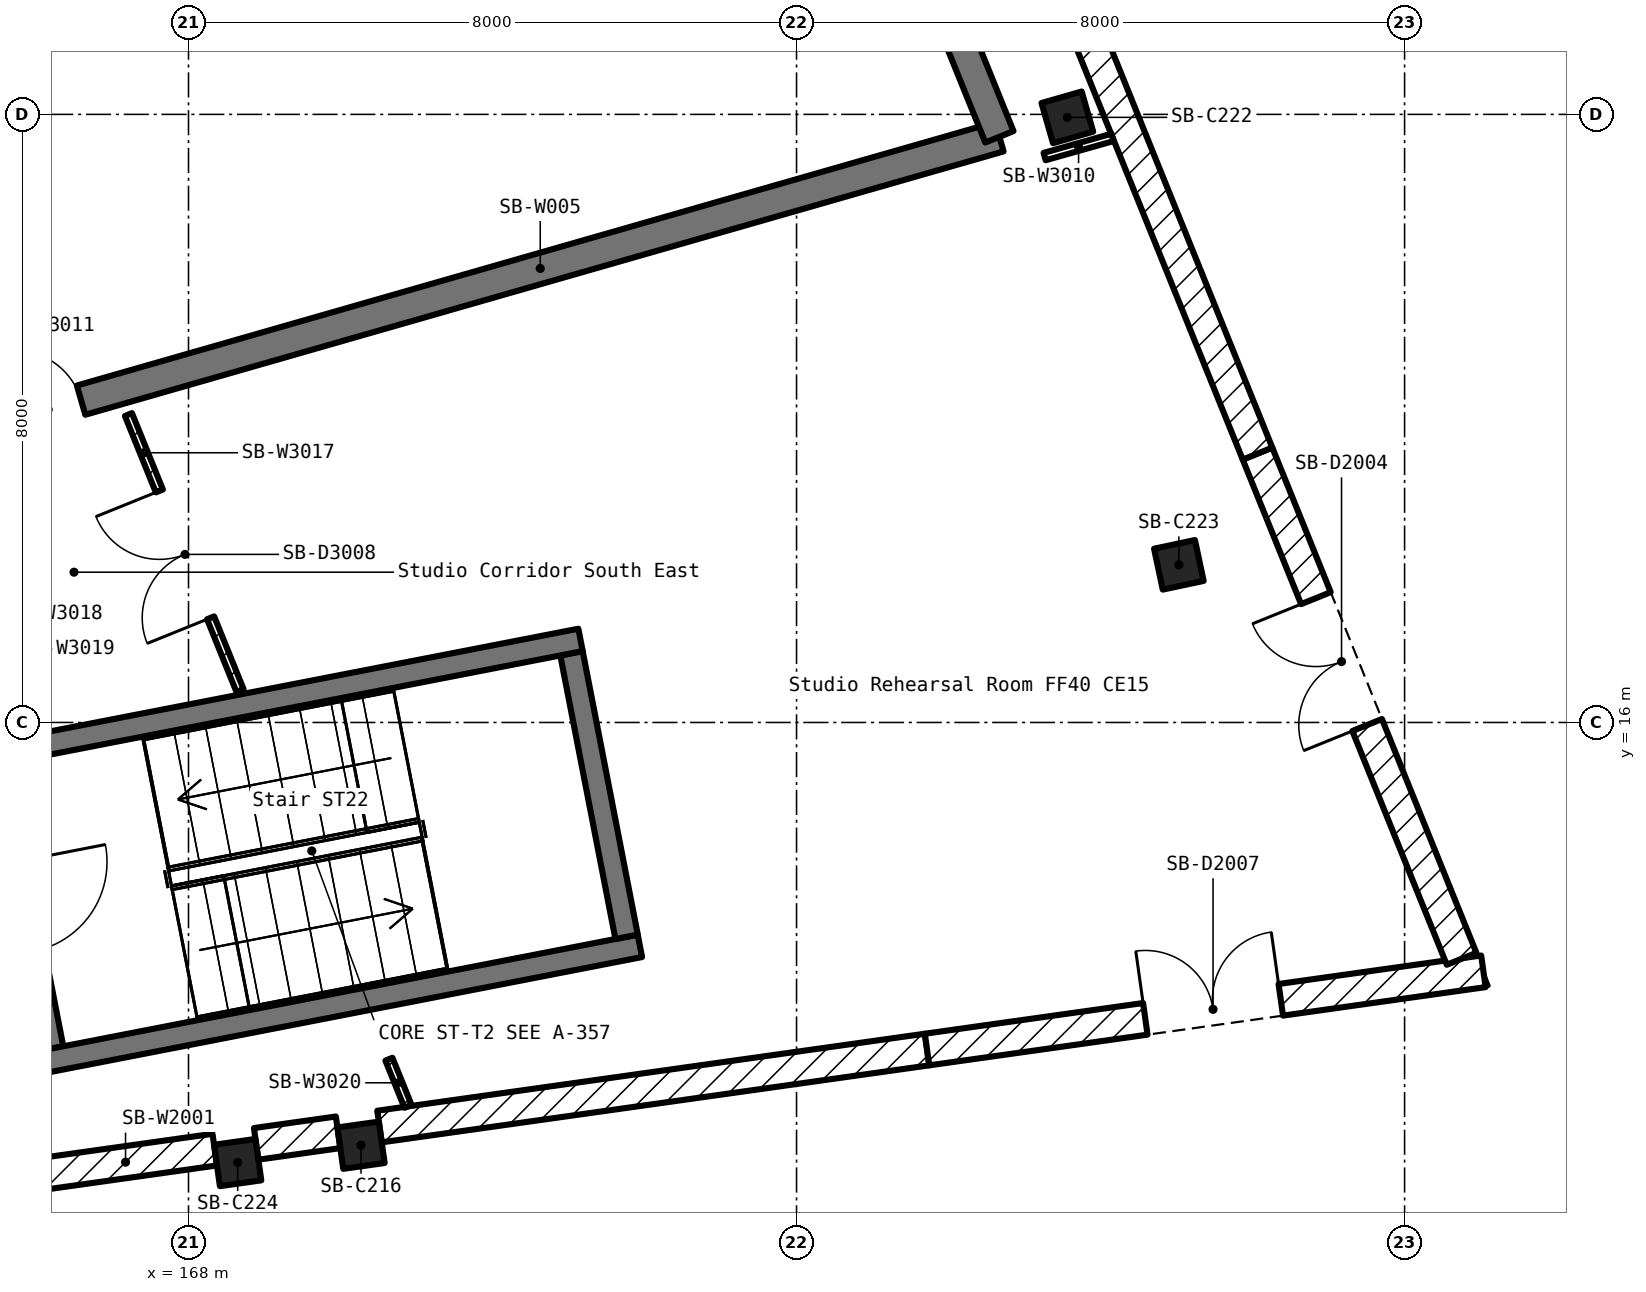
"""IFC4 building model, lengths in metres.
Left out: names, types, materials, properties, quantities, classifications, styles, units other than length and angle.
Written with IfcOpenShell. Run it as: python <this file> out.ifc"""

import sys

from ifc_helpers import new_model, si_unit, direction, frame, frame_2d, origin, origin_2d, place, context, subcontext, project, spatial, rectangle, extrude, element, fill, save


model = new_model("IFC4")
c1 = context("Model", 3, precision=1e-05, world=origin(), true_north=direction((0.0, 1.0)))
c2 = subcontext(c1, "Body", "Model", "MODEL_VIEW")
j1 = project(units=[si_unit("LENGTHUNIT", "METRE"), si_unit("PLANEANGLEUNIT", "RADIAN")], contexts=[c1])
p1 = place(None, origin())
s1 = spatial("IfcSite", under=j1, at=p1, CompositionType="ELEMENT")
p2 = place(p1, origin())
s2 = spatial("IfcBuilding", under=s1, at=p2, CompositionType="ELEMENT")
p3 = place(p2, origin())
s3 = spatial("IfcBuildingStorey", under=s2, at=p3, CompositionType="ELEMENT", Elevation=0.0)
for number, where, z_axis, x_axis in (
    (1, (170.27, 10.438, 0.0), (0.0, 0.0, 1.0), (0.139, -0.99, 0.0)),
    (2, (179.563, 23.961, 0.0), (0.0, 0.0, 1.0), (0.276, -0.961, 0.0)),
    (3, (181.03, 18.074, 0.0), (0.0, 0.0, 1.0), (0.208, -0.978, 0.0)),
    (4, (168.647, 10.21, 0.0), (0.0, 0.0, 1.0), (0.139, -0.99, 0.0)),
):
    element("IfcColumn", number, at=place(p3, frame(where, z_axis=z_axis, x_axis=x_axis)), inside=s3, PredefinedType="COLUMN", context=c2, shape_type="SweptSolid", body=[
        extrude(rectangle(XDim=0.55, YDim=0.55, at=origin_2d()), origin(), (0.0, 0.0, 1.0), 6.0),
    ])
p4 = place(p3, frame((157.521, 17.641, -6.3), z_axis=(0.0, 0.0, 1.0), x_axis=(0.961263044958, 0.275632651182, 0.0)))
e5 = element("IfcWall", 5, at=p4, inside=s3, PredefinedType="SHEAR", context=c2, shape_type="SweptSolid", body=[
    extrude(rectangle(XDim=22.0, YDim=0.4, at=frame_2d((11.0, 0.0))), origin(), (0.0, 0.0, 1.0), 12.3),
])
p5 = place(p4, frame((8.531, 0.0, 6.3)))
e6 = element("IfcOpeningElement", 6, at=p5, cuts=e5, PredefinedType="OPENING", context=c2, shape_type="SweptSolid", body=[
    extrude(rectangle(XDim=0.9, YDim=2.1, at=frame_2d((0.45, 1.05))), frame((0.0, 0.212, 0.0), z_axis=(0.0, -1.0, 0.0), x_axis=(1.0, 0.0, 0.0)), (0.0, 0.0, 1.0), 0.424),
])
p6 = place(p3, frame((178.669, 23.705, -6.3), z_axis=(0.0, 0.0, 1.0), x_axis=(-0.374642655757, 0.92716928362, 0.0)))
e7 = element("IfcWall", 7, at=p6, inside=s3, PredefinedType="SHEAR", context=c2, shape_type="SweptSolid", body=[
    extrude(rectangle(XDim=17.979, YDim=0.4, at=frame_2d((8.99, 0.0))), origin(), (0.0, 0.0, 1.0), 12.3),
])
p7 = place(p6, frame((8.09, 0.0, 6.3)))
e8 = element("IfcOpeningElement", 8, at=p7, cuts=e7, PredefinedType="OPENING", context=c2, shape_type="SweptSolid", body=[
    extrude(rectangle(XDim=1.8, YDim=2.1, at=frame_2d((0.9, 1.05))), frame((0.0, 0.212, 0.0), z_axis=(0.0, -1.0, 0.0), x_axis=(1.0, 0.0, 0.0)), (0.0, 0.0, 1.0), 0.424),
])
p8 = place(p6, frame((12.59, 0.0, 6.3)))
e9 = element("IfcOpeningElement", 9, at=p8, cuts=e7, PredefinedType="OPENING", context=c2, shape_type="SweptSolid", body=[
    extrude(rectangle(XDim=1.8, YDim=2.1, at=frame_2d((0.9, 1.05))), frame((0.0, 0.212, 0.0), z_axis=(0.0, -1.0, 0.0), x_axis=(1.0, 0.0, 0.0)), (0.0, 0.0, 1.0), 0.424),
])
p9 = place(p3, frame((163.077, 9.639, 0.0), z_axis=(0.0, 0.0, 1.0), x_axis=(0.990252820999, 0.139281551197, 0.0)))
e10 = element("IfcWall", 10, at=p9, inside=s3, PredefinedType="SOLIDWALL", context=c2, shape_type="SweptSolid", body=[
    extrude(rectangle(XDim=5.32, YDim=0.42, at=frame_2d((2.66, 0.0))), origin(), (0.0, 0.0, 1.0), 4.98),
])
p10 = place(p9, frame((1.15, 0.0, 0.0)))
e11 = element("IfcOpeningElement", 11, at=p10, cuts=e10, PredefinedType="OPENING", context=c2, shape_type="SweptSolid", body=[
    extrude(rectangle(XDim=1.8, YDim=2.4, at=frame_2d((0.9, 1.2))), frame((0.0, 0.222, 0.0), z_axis=(0.0, -1.0, 0.0), x_axis=(1.0, 0.0, 0.0)), (0.0, 0.0, 1.0), 0.444),
])
p11 = place(p3, frame((168.89, 10.456, 0.0), z_axis=(0.0, 0.0, 1.0), x_axis=(0.990225632743, 0.139474715481, 0.0)))
e12 = element("IfcWall", 12, at=p11, inside=s3, PredefinedType="SOLIDWALL", context=c2, shape_type="SweptSolid", body=[
    extrude(rectangle(XDim=1.089, YDim=0.42, at=frame_2d((0.544, 0.0))), origin(), (0.0, 0.0, 1.0), 4.98),
])
p12 = place(p3, frame((170.513, 10.684, 0.0), z_axis=(0.0, 0.0, 1.0), x_axis=(0.990259181758, 0.139236320493, 0.0)))
e13 = element("IfcWall", 13, at=p12, inside=s3, PredefinedType="SOLIDWALL", context=c2, shape_type="SweptSolid", body=[
    extrude(rectangle(XDim=7.275, YDim=0.42, at=frame_2d((3.637, 0.0))), origin(), (0.0, 0.0, 1.0), 5.78),
])
p13 = place(p3, frame((177.717, 11.697, 0.0), z_axis=(0.0, 0.0, 1.0), x_axis=(0.990262769028, 0.139210805171, 0.0)))
e14 = element("IfcWall", 14, at=p13, inside=s3, PredefinedType="SOLIDWALL", context=c2, shape_type="SweptSolid", body=[
    extrude(rectangle(XDim=7.392, YDim=0.42, at=frame_2d((3.696, 0.0))), origin(), (0.0, 0.0, 1.0), 5.78),
])
p14 = place(p13, frame((2.9, 0.0, 0.0)))
e15 = element("IfcOpeningElement", 15, at=p14, cuts=e14, PredefinedType="OPENING", context=c2, shape_type="SweptSolid", body=[
    extrude(rectangle(XDim=1.8, YDim=2.4, at=frame_2d((0.9, 1.2))), frame((0.0, 0.222, 0.0), z_axis=(0.0, -1.0, 0.0), x_axis=(1.0, 0.0, 0.0)), (0.0, 0.0, 1.0), 0.444),
])
p15 = place(p3, frame((184.75, 12.891, 0.0), z_axis=(0.0, 0.0, 1.0), x_axis=(-0.374594824941, 0.927188609252, 0.0)))
e16 = element("IfcWall", 16, at=p15, inside=s3, PredefinedType="SOLIDWALL", context=c2, shape_type="SweptSolid", body=[
    extrude(rectangle(XDim=7.168, YDim=0.42, at=frame_2d((3.584, 0.0))), origin(), (0.0, 0.0, 1.0), 5.78),
])
p16 = place(p15, frame((3.317, 0.0, 0.0)))
e17 = element("IfcOpeningElement", 17, at=p16, cuts=e16, PredefinedType="OPENING", context=c2, shape_type="SweptSolid", body=[
    extrude(rectangle(XDim=1.8, YDim=2.4, at=frame_2d((0.9, 1.2))), frame((0.0, 0.222, 0.0), z_axis=(0.0, -1.0, 0.0), x_axis=(1.0, 0.0, 0.0)), (0.0, 0.0, 1.0), 0.444),
])
p17 = place(p3, frame((182.065, 19.537, 0.0), z_axis=(0.0, 0.0, 1.0), x_axis=(-0.374594824941, 0.927188609252, 0.0)))
e18 = element("IfcWall", 18, at=p17, inside=s3, PredefinedType="SOLIDWALL", context=c2, shape_type="SweptSolid", body=[
    extrude(rectangle(XDim=7.168, YDim=0.42, at=frame_2d((3.584, 0.0))), origin(), (0.0, 0.0, 1.0), 5.78),
])
p18 = place(p3, frame((165.48, 15.441, 0.0), z_axis=(0.0, 0.0, 1.0), x_axis=(0.190824946063, -0.981624082814, 0.0)))
e19 = element("IfcWall", 19, at=p18, inside=s3, PredefinedType="SOLIDWALL", context=c2, shape_type="SweptSolid", body=[
    extrude(rectangle(XDim=3.8, YDim=0.3, at=frame_2d((1.9, 0.0))), origin(), (0.0, 0.0, 1.0), 6.0),
])
p19 = place(p18, frame((1.3, 0.0, 0.0)))
e20 = element("IfcOpeningElement", 20, at=p19, cuts=e19, PredefinedType="OPENING", context=c2, shape_type="SweptSolid", body=[
    extrude(rectangle(XDim=1.2, YDim=2.1, at=frame_2d((0.6, 1.05))), frame((0.0, 0.162, 0.0), z_axis=(0.0, -1.0, 0.0), x_axis=(1.0, 0.0, 0.0)), (0.0, 0.0, 1.0), 0.324),
])
p20 = place(p3, frame((166.086, 11.535, 0.0), z_axis=(0.0, 0.0, 1.0), x_axis=(0.981635396686, 0.190766737073, 0.0)))
e21 = element("IfcWall", 21, at=p20, inside=s3, PredefinedType="SOLIDWALL", context=c2, shape_type="SweptSolid", body=[
    extrude(rectangle(XDim=8.0, YDim=0.3, at=frame_2d((4.0, 0.0))), origin(), (0.0, 0.0, 1.0), 6.0),
])
p21 = place(p3, frame((173.764, 13.18, 0.0), z_axis=(0.0, 0.0, 1.0), x_axis=(-0.190763033741, 0.981636116368, 0.0)))
e22 = element("IfcWall", 22, at=p21, inside=s3, PredefinedType="SOLIDWALL", context=c2, shape_type="SweptSolid", body=[
    extrude(rectangle(XDim=3.8, YDim=0.3, at=frame_2d((1.9, 0.0))), origin(), (0.0, 0.0, 1.0), 6.0),
])
p22 = place(p3, frame((173.158, 17.086, 0.0), z_axis=(0.0, 0.0, 1.0), x_axis=(-0.981641111144, -0.190737329623, 0.0)))
e23 = element("IfcWall", 23, at=p22, inside=s3, PredefinedType="SOLIDWALL", context=c2, shape_type="SweptSolid", body=[
    extrude(rectangle(XDim=8.0, YDim=0.3, at=frame_2d((4.0, 0.0))), origin(), (0.0, 0.0, 1.0), 6.0),
])
p23 = place(p3, frame((179.264, 23.445, 0.0), z_axis=(0.0, 0.0, 1.0), x_axis=(0.962432048277, 0.271522655501, 0.0)))
e24 = element("IfcWall", 24, at=p23, inside=s3, PredefinedType="PARTITIONING", context=c2, shape_type="SweptSolid", body=[
    extrude(rectangle(XDim=0.928, YDim=0.1, at=frame_2d((0.464, 0.0))), origin(), (0.0, 0.0, 1.0), 4.88),
])
p24 = place(p3, frame((168.678, 16.419, 0.0), z_axis=(0.0, 0.0, 1.0), x_axis=(-0.374729910149, 0.927134021833, 0.0)))
e25 = element("IfcWall", 25, at=p24, inside=s3, PredefinedType="PARTITIONING", context=c2, shape_type="SweptSolid", body=[
    extrude(rectangle(XDim=3.917, YDim=0.1, at=frame_2d((1.959, 0.0))), origin(), (0.0, 0.0, 1.0), 4.88),
])
p25 = place(p24, frame((1.033, 0.0, 0.0)))
e26 = element("IfcOpeningElement", 26, at=p25, cuts=e25, PredefinedType="OPENING", context=c2, shape_type="SweptSolid", body=[
    extrude(rectangle(XDim=1.8, YDim=2.1, at=frame_2d((0.9, 1.05))), frame((0.0, 0.062, 0.0), z_axis=(0.0, -1.0, 0.0), x_axis=(1.0, 0.0, 0.0)), (0.0, 0.0, 1.0), 0.124),
])
p26 = place(p3, frame((170.888, 10.949, 0.0), z_axis=(0.0, 0.0, 1.0), x_axis=(-0.374655870393, 0.927163943852, 0.0)))
e27 = element("IfcWall", 27, at=p26, inside=s3, PredefinedType="PARTITIONING", context=c2, shape_type="SweptSolid", body=[
    extrude(rectangle(XDim=0.67, YDim=0.1, at=frame_2d((0.335, 0.0))), origin(), (0.0, 0.0, 1.0), 4.88),
])
p27 = place(p16, origin())
e28 = element("IfcDoor", 28, at=p27, inside=s3, OperationType="DOUBLE_DOOR_DOUBLE_SWING", PredefinedType="DOOR", context=c2, shape_type="SweptSolid", body=[
    extrude(rectangle(XDim=1.8, YDim=2.4, at=frame_2d((0.9, 1.2))), frame((0.0, 0.025, 0.0), z_axis=(0.0, -1.0, 0.0), x_axis=(1.0, 0.0, 0.0)), (0.0, 0.0, 1.0), 0.05),
])
fill(e17, e28)
p28 = place(p25, origin())
e29 = element("IfcDoor", 29, at=p28, inside=s3, OperationType="DOUBLE_DOOR_SINGLE_SWING", PredefinedType="DOOR", context=c2, shape_type="SweptSolid", body=[
    extrude(rectangle(XDim=1.8, YDim=2.1, at=frame_2d((0.9, 1.05))), frame((0.0, 0.025, 0.0), z_axis=(0.0, -1.0, 0.0), x_axis=(1.0, 0.0, 0.0)), (0.0, 0.0, 1.0), 0.05),
])
fill(e26, e29)
p29 = place(p5, origin())
e30 = element("IfcDoor", 30, at=p29, inside=s3, OperationType="SINGLE_SWING_LEFT", PredefinedType="DOOR", context=c2, shape_type="SweptSolid", body=[
    extrude(rectangle(XDim=0.9, YDim=2.1, at=frame_2d((0.45, 1.05))), frame((0.0, 0.025, 0.0), z_axis=(0.0, -1.0, 0.0), x_axis=(1.0, 0.0, 0.0)), (0.0, 0.0, 1.0), 0.05),
])
fill(e6, e30)
p30 = place(p14, origin())
e31 = element("IfcDoor", 31, at=p30, inside=s3, OperationType="DOUBLE_DOOR_DOUBLE_SWING", PredefinedType="DOOR", context=c2, shape_type="SweptSolid", body=[
    extrude(rectangle(XDim=1.8, YDim=2.4, at=frame_2d((0.9, 1.2))), frame((0.0, 0.025, 0.0), z_axis=(0.0, -1.0, 0.0), x_axis=(1.0, 0.0, 0.0)), (0.0, 0.0, 1.0), 0.05),
])
fill(e15, e31)
save(model, sys.argv[1])
